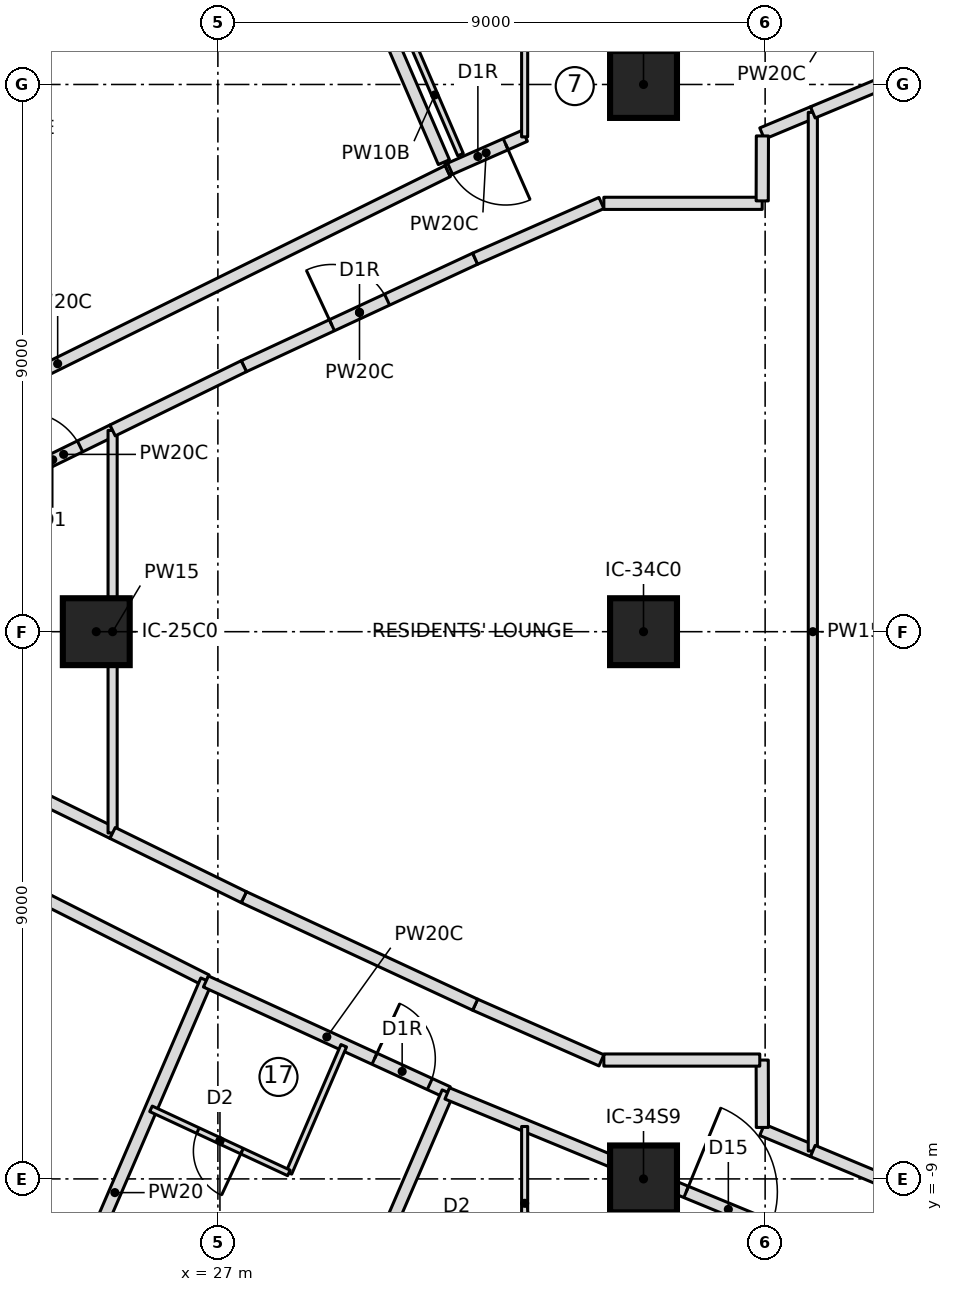
"""IFC4 building model, lengths in metres.
Left out: names, types, materials, properties, quantities, classifications, styles, units other than length and angle.
Written with IfcOpenShell. Run it as: python <this file> out.ifc"""

import sys

from ifc_helpers import new_model, si_unit, direction, frame, frame_2d, origin, origin_2d, place, context, subcontext, project, spatial, rectangle, extrude, element, fill, save


model = new_model("IFC4")
c1 = context("Model", 3, precision=1e-05, world=origin(), true_north=direction((0.0, 1.0)))
c2 = subcontext(c1, "Body", "Model", "MODEL_VIEW")
j1 = project(units=[si_unit("LENGTHUNIT", "METRE"), si_unit("PLANEANGLEUNIT", "RADIAN")], contexts=[c1])
p1 = place(None, origin())
s1 = spatial("IfcSite", under=j1, at=p1, CompositionType="ELEMENT")
p2 = place(p1, origin())
s2 = spatial("IfcBuilding", under=s1, at=p2, CompositionType="ELEMENT")
p3 = place(p2, frame((0.0, 0.0, 130.2)))
s3 = spatial("IfcBuildingStorey", under=s2, at=p3, CompositionType="ELEMENT", Elevation=130.2)
for number, where, z_axis, x_axis in (
    (1, (25.0, 0.0, 0.0), (0.0, 0.0, 1.0), (1.0, 0.0, 0.0)),
    (2, (34.0, -9.0, 0.0), (0.0, 0.0, 1.0), (1.0, 0.0, 0.0)),
    (3, (34.0, 0.0, 0.0), (0.0, 0.0, 1.0), (1.0, 0.0, 0.0)),
    (4, (34.0, 9.0, 0.0), (0.0, 0.0, 1.0), (1.0, 0.0, 0.0)),
):
    element("IfcColumn", number, at=place(p3, frame(where, z_axis=z_axis, x_axis=x_axis)), inside=s3, PredefinedType="COLUMN", context=c2, shape_type="SweptSolid", body=[
        extrude(rectangle(XDim=1.1, YDim=1.1, at=origin_2d()), origin(), (0.0, 0.0, 1.0), 3.55),
    ])
p4 = place(p3, frame((17.95, 1.238, 0.0), z_axis=(0.0, 0.0, 1.0), x_axis=(0.896593504408, 0.44285447706, 0.0)))
e5 = element("IfcWall", 5, at=p4, inside=s3, PredefinedType="PARTITIONING", context=c2, shape_type="SweptSolid", body=[
    extrude(rectangle(XDim=14.31, YDim=0.2, at=frame_2d((7.155, 0.0))), origin(), (0.0, 0.0, 1.0), 3.25),
])
p5 = place(p4, frame((3.05, 0.0, 0.0)))
e6 = element("IfcOpeningElement", 6, at=p5, cuts=e5, PredefinedType="OPENING", context=c2, shape_type="SweptSolid", body=[
    extrude(rectangle(XDim=1.5, YDim=2.1, at=frame_2d((0.75, 1.05))), frame((0.0, 0.11, 0.0), z_axis=(0.0, -1.0, 0.0), x_axis=(1.0, 0.0, 0.0)), (0.0, 0.0, 1.0), 0.22),
])
p6 = place(p3, frame((30.717, 7.722, 0.0), z_axis=(0.0, 0.0, 1.0), x_axis=(-0.395993466394, 0.918253328104, 0.0)))
e7 = element("IfcWall", 7, at=p6, inside=s3, PredefinedType="PARTITIONING", context=c2, shape_type="SweptSolid", body=[
    extrude(rectangle(XDim=7.44, YDim=0.2, at=frame_2d((3.72, 0.0))), origin(), (0.0, 0.0, 1.0), 3.25),
])
p7 = place(p3, frame((32.05, 8.157, 0.0), z_axis=(0.0, 0.0, 1.0), x_axis=(-0.915155082005, -0.403101942293, 0.0)))
e8 = element("IfcWall", 8, at=p7, inside=s3, PredefinedType="PARTITIONING", context=c2, shape_type="SweptSolid", body=[
    extrude(rectangle(XDim=1.396, YDim=0.2, at=frame_2d((0.698, 0.0))), origin(), (0.0, 0.0, 1.0), 3.25),
])
p8 = place(p7, frame((0.346, 0.0, 0.0)))
e9 = element("IfcOpeningElement", 9, at=p8, cuts=e8, PredefinedType="OPENING", context=c2, shape_type="SweptSolid", body=[
    extrude(rectangle(XDim=1.0, YDim=2.1, at=frame_2d((0.5, 1.05))), frame((0.0, 0.11, 0.0), z_axis=(0.0, -1.0, 0.0), x_axis=(1.0, 0.0, 0.0)), (0.0, 0.0, 1.0), 0.22),
])
p9 = place(p3, frame((30.99, 7.846, 0.0), z_axis=(0.0, 0.0, 1.0), x_axis=(-0.396055229638, 0.918226690462, 0.0)))
e10 = element("IfcWall", 10, at=p9, inside=s3, PredefinedType="PARTITIONING", context=c2, shape_type="SweptSolid", body=[
    extrude(rectangle(XDim=2.137, YDim=0.1, at=frame_2d((1.069, 0.0))), origin(), (0.0, 0.0, 1.0), 3.25),
])
p10 = place(p3, frame((17.95, -1.261, 0.0), z_axis=(0.0, 0.0, 1.0), x_axis=(0.892679126003, -0.450692775623, 0.0)))
e11 = element("IfcWall", 11, at=p10, inside=s3, PredefinedType="PARTITIONING", context=c2, shape_type="SweptSolid", body=[
    extrude(rectangle(XDim=9.927, YDim=0.2, at=frame_2d((4.963, 0.0))), origin(), (0.0, 0.0, 1.0), 3.25),
])
p11 = place(p10, frame((3.05, 0.0, 0.0)))
e12 = element("IfcOpeningElement", 12, at=p11, cuts=e11, PredefinedType="OPENING", context=c2, shape_type="SweptSolid", body=[
    extrude(rectangle(XDim=1.5, YDim=2.1, at=frame_2d((0.75, 1.05))), frame((0.0, 0.11, 0.0), z_axis=(0.0, -1.0, 0.0), x_axis=(1.0, 0.0, 0.0)), (0.0, 0.0, 1.0), 0.22),
])
p12 = place(p3, frame((23.801, -12.716, 0.0), z_axis=(0.0, 0.0, 1.0), x_axis=(0.395995556294, 0.918252426839, 0.0)))
e13 = element("IfcWall", 13, at=p12, inside=s3, PredefinedType="PARTITIONING", context=c2, shape_type="SweptSolid", body=[
    extrude(rectangle(XDim=7.603, YDim=0.2, at=frame_2d((3.802, 0.0))), origin(), (0.0, 0.0, 1.0), 3.25),
])
p13 = place(p3, frame((26.803, -5.753, 0.0), z_axis=(0.0, 0.0, 1.0), x_axis=(0.90910092787, -0.416575926987, 0.0)))
e14 = element("IfcWall", 14, at=p13, inside=s3, PredefinedType="PARTITIONING", context=c2, shape_type="SweptSolid", body=[
    extrude(rectangle(XDim=4.375, YDim=0.2, at=frame_2d((2.188, 0.0))), origin(), (0.0, 0.0, 1.0), 3.25),
])
p14 = place(p13, frame((3.05, 0.0, 0.0)))
e15 = element("IfcOpeningElement", 15, at=p14, cuts=e14, PredefinedType="OPENING", context=c2, shape_type="SweptSolid", body=[
    extrude(rectangle(XDim=1.0, YDim=2.1, at=frame_2d((0.5, 1.05))), frame((0.0, 0.11, 0.0), z_axis=(0.0, -1.0, 0.0), x_axis=(1.0, 0.0, 0.0)), (0.0, 0.0, 1.0), 0.22),
])
p15 = place(p3, frame((29.07, -6.81, 0.0), z_axis=(0.0, 0.0, 1.0), x_axis=(-0.396000751487, -0.918250186399, 0.0)))
e16 = element("IfcWall", 16, at=p15, inside=s3, PredefinedType="PARTITIONING", context=c2, shape_type="SweptSolid", body=[
    extrude(rectangle(XDim=2.278, YDim=0.1, at=frame_2d((1.139, 0.0))), origin(), (0.0, 0.0, 1.0), 3.25),
])
p16 = place(p3, frame((28.168, -8.902, 0.0), z_axis=(0.0, 0.0, 1.0), x_axis=(-0.906813113059, 0.421532890751, 0.0)))
e17 = element("IfcWall", 17, at=p16, inside=s3, PredefinedType="PARTITIONING", context=c2, shape_type="SweptSolid", body=[
    extrude(rectangle(XDim=2.501, YDim=0.1, at=frame_2d((1.25, 0.0))), origin(), (0.0, 0.0, 1.0), 3.25),
])
p17 = place(p16, frame((0.85, 0.0, 0.0)))
e18 = element("IfcOpeningElement", 18, at=p17, cuts=e17, PredefinedType="OPENING", context=c2, shape_type="SweptSolid", body=[
    extrude(rectangle(XDim=0.8, YDim=2.1, at=frame_2d((0.4, 1.05))), frame((0.0, 0.06, 0.0), z_axis=(0.0, -1.0, 0.0), x_axis=(1.0, 0.0, 0.0)), (0.0, 0.0, 1.0), 0.12),
])
p18 = place(p3, frame((27.771, -14.554, 0.0), z_axis=(0.0, 0.0, 1.0), x_axis=(0.396004020147, 0.918248776763, 0.0)))
e19 = element("IfcWall", 19, at=p18, inside=s3, PredefinedType="PARTITIONING", context=c2, shape_type="SweptSolid", body=[
    extrude(rectangle(XDim=7.6, YDim=0.2, at=frame_2d((3.8, 0.0))), origin(), (0.0, 0.0, 1.0), 3.25),
])
p19 = place(p3, frame((30.772, -7.594, 0.0), z_axis=(0.0, 0.0, 1.0), x_axis=(0.924461873383, -0.381274500407, 0.0)))
e20 = element("IfcWall", 20, at=p19, inside=s3, PredefinedType="PARTITIONING", context=c2, shape_type="SweptSolid", body=[
    extrude(rectangle(XDim=13.127, YDim=0.2, at=frame_2d((6.564, 0.0))), origin(), (0.0, 0.0, 1.0), 3.25),
])
p20 = place(p19, frame((4.25, 0.0, 0.0)))
e21 = element("IfcOpeningElement", 21, at=p20, cuts=e20, PredefinedType="OPENING", context=c2, shape_type="SweptSolid", body=[
    extrude(rectangle(XDim=1.5, YDim=2.1, at=frame_2d((0.75, 1.05))), frame((0.0, 0.11, 0.0), z_axis=(0.0, -1.0, 0.0), x_axis=(1.0, 0.0, 0.0)), (0.0, 0.0, 1.0), 0.22),
])
p21 = place(p3, frame((23.659, 2.522, 0.0), z_axis=(0.0, 0.0, 1.0), x_axis=(0.898127473276, 0.439735195028, 0.0)))
e22 = element("IfcWall", 22, at=p21, inside=s3, PredefinedType="PARTITIONING", context=c2, shape_type="SweptSolid", body=[
    extrude(rectangle(XDim=1.793, YDim=0.2, at=frame_2d((0.896, 0.0))), origin(), (0.0, 0.0, 1.0), 3.25),
])
p22 = place(p21, frame((0.196, 0.0, 0.0)))
e23 = element("IfcOpeningElement", 23, at=p22, cuts=e22, PredefinedType="OPENING", context=c2, shape_type="SweptSolid", body=[
    extrude(rectangle(XDim=1.0, YDim=2.1, at=frame_2d((0.5, 1.05))), frame((0.0, 0.11, 0.0), z_axis=(0.0, -1.0, 0.0), x_axis=(1.0, 0.0, 0.0)), (0.0, 0.0, 1.0), 0.22),
])
p23 = place(p3, frame((25.269, -3.31, 0.0), z_axis=(0.0, 0.0, 1.0), x_axis=(-0.898127473276, 0.439735195028, 0.0)))
e24 = element("IfcWall", 24, at=p23, inside=s3, PredefinedType="PARTITIONING", context=c2, shape_type="SweptSolid", body=[
    extrude(rectangle(XDim=1.793, YDim=0.2, at=frame_2d((0.896, 0.0))), origin(), (0.0, 0.0, 1.0), 3.25),
])
p24 = place(p3, frame((25.269, -3.31, 0.0), z_axis=(0.0, 0.0, 1.0), x_axis=(0.0, 1.0, 0.0)))
e25 = element("IfcWall", 25, at=p24, inside=s3, PredefinedType="PARTITIONING", context=c2, shape_type="SweptSolid", body=[
    extrude(rectangle(XDim=6.621, YDim=0.15, at=frame_2d((3.31, 0.0))), origin(), (0.0, 0.0, 1.0), 3.25),
])
p25 = place(p3, frame((27.427, 4.367, 0.0), z_axis=(0.0, 0.0, 1.0), x_axis=(0.906830275285, 0.421495968933, 0.0)))
e26 = element("IfcWall", 26, at=p25, inside=s3, PredefinedType="PARTITIONING", context=c2, shape_type="SweptSolid", body=[
    extrude(rectangle(XDim=4.195, YDim=0.2, at=frame_2d((2.098, 0.0))), origin(), (0.0, 0.0, 1.0), 3.25),
])
p26 = place(p25, frame((1.598, 0.0, 0.0)))
e27 = element("IfcOpeningElement", 27, at=p26, cuts=e26, PredefinedType="OPENING", context=c2, shape_type="SweptSolid", body=[
    extrude(rectangle(XDim=1.0, YDim=2.1, at=frame_2d((0.5, 1.05))), frame((0.0, 0.11, 0.0), z_axis=(0.0, -1.0, 0.0), x_axis=(1.0, 0.0, 0.0)), (0.0, 0.0, 1.0), 0.22),
])
p27 = place(p3, frame((31.231, 6.135, 0.0), z_axis=(0.0, 0.0, 1.0), x_axis=(0.915102334452, 0.403221672881, 0.0)))
e28 = element("IfcWall", 28, at=p27, inside=s3, PredefinedType="PARTITIONING", context=c2, shape_type="SweptSolid", body=[
    extrude(rectangle(XDim=2.269, YDim=0.2, at=frame_2d((1.135, 0.0))), origin(), (0.0, 0.0, 1.0), 3.25),
])
for number, where, z_axis, x_axis in (
    (29, (35.95, 8.193, 0.0), (0.0, 0.0, 1.0), (0.923, 0.385, 0.0)),
    (30, (36.784, -8.541, 0.0), (0.0, 0.0, 1.0), (-0.923, 0.385, 0.0)),
):
    element("IfcWall", number, at=place(p3, frame(where, z_axis=z_axis, x_axis=x_axis)), inside=s3, PredefinedType="PARTITIONING", context=c2, shape_type="SweptSolid", body=[
        extrude(rectangle(XDim=0.904, YDim=0.2, at=frame_2d((0.452, 0.0))), origin(), (0.0, 0.0, 1.0), 3.25),
    ])
p28 = place(p3, frame((33.308, -7.05, 0.0), z_axis=(0.0, 0.0, 1.0), x_axis=(-0.915102334452, 0.403221672881, 0.0)))
e31 = element("IfcWall", 31, at=p28, inside=s3, PredefinedType="PARTITIONING", context=c2, shape_type="SweptSolid", body=[
    extrude(rectangle(XDim=2.269, YDim=0.2, at=frame_2d((1.135, 0.0))), origin(), (0.0, 0.0, 1.0), 3.25),
])
p29 = place(p3, frame((31.231, -6.135, 0.0), z_axis=(0.0, 0.0, 1.0), x_axis=(-0.906830275285, 0.421495968933, 0.0)))
e32 = element("IfcWall", 32, at=p29, inside=s3, PredefinedType="PARTITIONING", context=c2, shape_type="SweptSolid", body=[
    extrude(rectangle(XDim=4.195, YDim=0.2, at=frame_2d((2.098, 0.0))), origin(), (0.0, 0.0, 1.0), 3.25),
])
for number, where, z_axis, x_axis in (
    (33, (27.427, -4.367, 0.0), (0.0, 0.0, 1.0), (-0.898, 0.44, 0.0)),
    (34, (25.269, 3.31, 0.0), (0.0, 0.0, 1.0), (0.898, 0.44, 0.0)),
):
    element("IfcWall", number, at=place(p3, frame(where, z_axis=z_axis, x_axis=x_axis)), inside=s3, PredefinedType="PARTITIONING", context=c2, shape_type="SweptSolid", body=[
        extrude(rectangle(XDim=2.403, YDim=0.2, at=frame_2d((1.201, 0.0))), origin(), (0.0, 0.0, 1.0), 3.25),
    ])
p30 = place(p3, frame((36.784, -8.541, 0.0), z_axis=(0.0, 0.0, 1.0), x_axis=(0.0, 1.0, 0.0)))
e35 = element("IfcWall", 35, at=p30, inside=s3, PredefinedType="PARTITIONING", context=c2, shape_type="SweptSolid", body=[
    extrude(rectangle(XDim=17.082, YDim=0.15, at=frame_2d((8.541, 0.0))), origin(), (0.0, 0.0, 1.0), 3.25),
])
for number, where, z_axis, x_axis in (
    (36, (38.943, -9.441, 0.0), (0.0, 0.0, 1.0), (-0.923, 0.385, 0.0)),
    (37, (36.784, 8.541, 0.0), (0.0, 0.0, 1.0), (0.923, 0.385, 0.0)),
):
    element("IfcWall", number, at=place(p3, frame(where, z_axis=z_axis, x_axis=x_axis)), inside=s3, PredefinedType="PARTITIONING", context=c2, shape_type="SweptSolid", body=[
        extrude(rectangle(XDim=2.339, YDim=0.2, at=frame_2d((1.169, 0.0))), origin(), (0.0, 0.0, 1.0), 3.25),
    ])
p31 = place(p3, frame((32.045, 10.661, 0.0), z_axis=(0.0, 0.0, 1.0), x_axis=(0.0, -1.0, 0.0)))
e38 = element("IfcWall", 38, at=p31, inside=s3, PredefinedType="PARTITIONING", context=c2, shape_type="SweptSolid", body=[
    extrude(rectangle(XDim=2.523, YDim=0.1, at=frame_2d((1.261, 0.0))), origin(), (0.0, 0.0, 1.0), 3.25),
])
p32 = place(p3, frame((32.045, -8.138, 0.0), z_axis=(0.0, 0.0, 1.0), x_axis=(0.0, -1.0, 0.0)))
e39 = element("IfcWall", 39, at=p32, inside=s3, PredefinedType="PARTITIONING", context=c2, shape_type="SweptSolid", body=[
    extrude(rectangle(XDim=2.526, YDim=0.1, at=frame_2d((1.263, 0.0))), origin(), (0.0, 0.0, 1.0), 3.25),
])
p33 = place(p3, frame((35.955, -8.154, 0.0), z_axis=(0.0, 0.0, 1.0), x_axis=(-0.002643744892, 0.9999965053, 0.0)))
e40 = element("IfcWall", 40, at=p33, inside=s3, PredefinedType="PARTITIONING", context=c2, shape_type="SweptSolid", body=[
    extrude(rectangle(XDim=1.108, YDim=0.2, at=frame_2d((0.554, 0.0))), origin(), (0.0, 0.0, 1.0), 3.25),
])
p34 = place(p3, frame((35.912, -7.045, 0.0), z_axis=(0.0, 0.0, 1.0), x_axis=(-0.999999981873, 0.000190403652, 0.0)))
e41 = element("IfcWall", 41, at=p34, inside=s3, PredefinedType="PARTITIONING", context=c2, shape_type="SweptSolid", body=[
    extrude(rectangle(XDim=2.564, YDim=0.2, at=frame_2d((1.282, 0.0))), origin(), (0.0, 0.0, 1.0), 3.25),
])
p35 = place(p3, frame((33.347, 7.045, 0.0), z_axis=(0.0, 0.0, 1.0), x_axis=(0.999999982426, 0.000187476562, 0.0)))
e42 = element("IfcWall", 42, at=p35, inside=s3, PredefinedType="PARTITIONING", context=c2, shape_type="SweptSolid", body=[
    extrude(rectangle(XDim=2.604, YDim=0.2, at=frame_2d((1.302, 0.0))), origin(), (0.0, 0.0, 1.0), 3.25),
])
p36 = place(p3, frame((35.952, 7.085, 0.0), z_axis=(0.0, 0.0, 1.0), x_axis=(0.002742846825, 0.999996238389, 0.0)))
e43 = element("IfcWall", 43, at=p36, inside=s3, PredefinedType="PARTITIONING", context=c2, shape_type="SweptSolid", body=[
    extrude(rectangle(XDim=1.068, YDim=0.2, at=frame_2d((0.534, 0.0))), origin(), (0.0, 0.0, 1.0), 3.25),
])
p37 = place(p8, origin())
e44 = element("IfcDoor", 44, at=p37, inside=s3, OperationType="SINGLE_SWING_RIGHT", PredefinedType="DOOR", context=c2, shape_type="SweptSolid", body=[
    extrude(rectangle(XDim=1.0, YDim=2.1, at=frame_2d((0.5, 1.05))), frame((0.0, 0.025, 0.0), z_axis=(0.0, -1.0, 0.0), x_axis=(1.0, 0.0, 0.0)), (0.0, 0.0, 1.0), 0.05),
])
fill(e9, e44)
p38 = place(p17, origin())
e45 = element("IfcDoor", 45, at=p38, inside=s3, OperationType="SINGLE_SWING_LEFT", PredefinedType="DOOR", context=c2, shape_type="SweptSolid", body=[
    extrude(rectangle(XDim=0.8, YDim=2.1, at=frame_2d((0.4, 1.05))), frame((0.0, 0.025, 0.0), z_axis=(0.0, -1.0, 0.0), x_axis=(1.0, 0.0, 0.0)), (0.0, 0.0, 1.0), 0.05),
])
fill(e18, e45)
p39 = place(p14, origin())
e46 = element("IfcDoor", 46, at=p39, inside=s3, OperationType="SINGLE_SWING_RIGHT", PredefinedType="DOOR", context=c2, shape_type="SweptSolid", body=[
    extrude(rectangle(XDim=1.0, YDim=2.1, at=frame_2d((0.5, 1.05))), frame((0.0, 0.025, 0.0), z_axis=(0.0, -1.0, 0.0), x_axis=(1.0, 0.0, 0.0)), (0.0, 0.0, 1.0), 0.05),
])
fill(e15, e46)
p40 = place(p20, origin())
e47 = element("IfcDoor", 47, at=p40, inside=s3, OperationType="DOUBLE_DOOR_SINGLE_SWING", PredefinedType="DOOR", context=c2, shape_type="SweptSolid", body=[
    extrude(rectangle(XDim=1.5, YDim=2.1, at=frame_2d((0.75, 1.05))), frame((0.0, 0.025, 0.0), z_axis=(0.0, -1.0, 0.0), x_axis=(1.0, 0.0, 0.0)), (0.0, 0.0, 1.0), 0.05),
])
fill(e21, e47)
p41 = place(p22, origin())
e48 = element("IfcDoor", 48, at=p41, inside=s3, OperationType="SINGLE_SWING_LEFT", PredefinedType="DOOR", context=c2, shape_type="SweptSolid", body=[
    extrude(rectangle(XDim=1.0, YDim=2.1, at=frame_2d((0.5, 1.05))), frame((0.0, 0.025, 0.0), z_axis=(0.0, -1.0, 0.0), x_axis=(1.0, 0.0, 0.0)), (0.0, 0.0, 1.0), 0.05),
])
fill(e23, e48)
p42 = place(p26, origin())
e49 = element("IfcDoor", 49, at=p42, inside=s3, OperationType="SINGLE_SWING_RIGHT", PredefinedType="DOOR", context=c2, shape_type="SweptSolid", body=[
    extrude(rectangle(XDim=1.0, YDim=2.1, at=frame_2d((0.5, 1.05))), frame((0.0, 0.025, 0.0), z_axis=(0.0, -1.0, 0.0), x_axis=(1.0, 0.0, 0.0)), (0.0, 0.0, 1.0), 0.05),
])
fill(e27, e49)
save(model, sys.argv[1])
